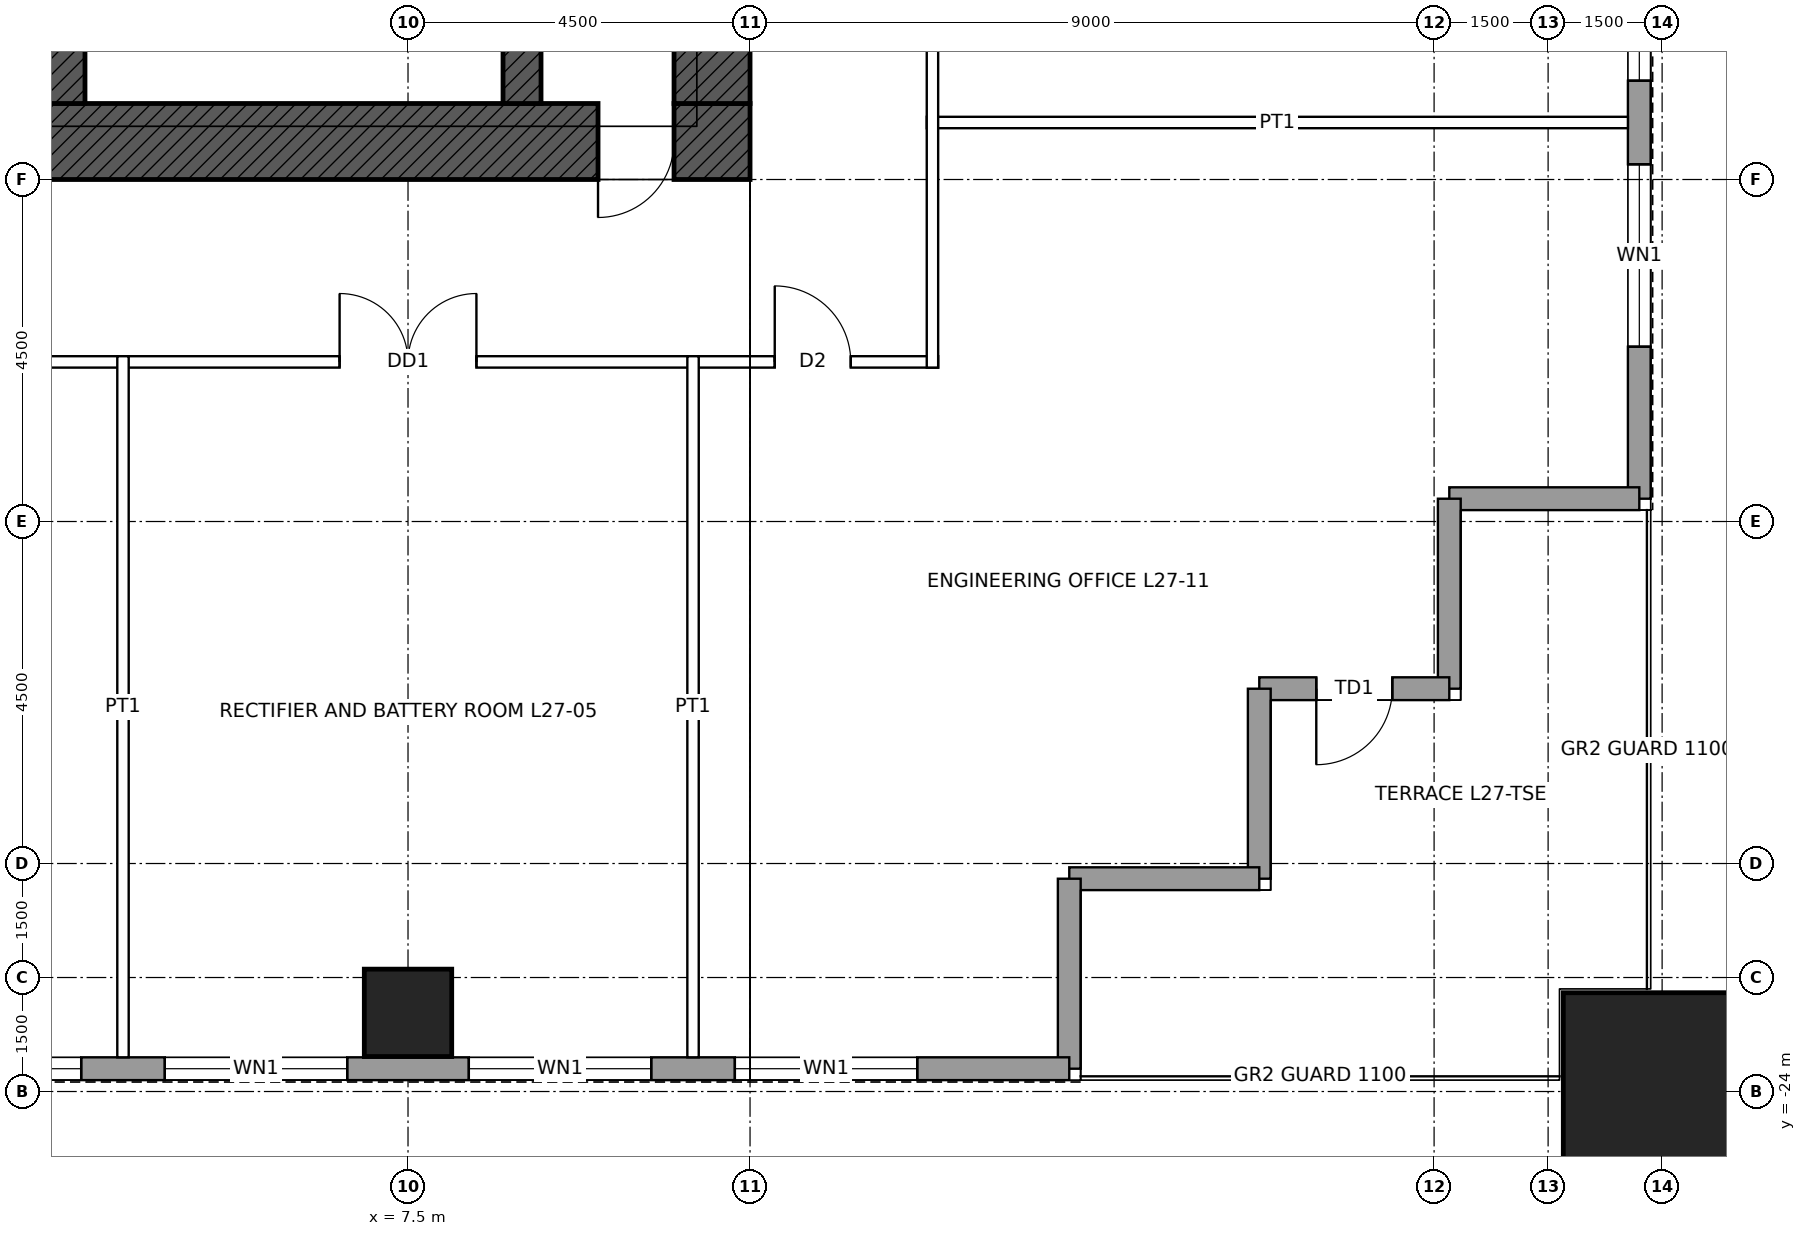
"""IFC4 building model, lengths in metres.
Left out: names, types, materials, properties, quantities, classifications, styles, units other than length and angle.
Written with IfcOpenShell. Run it as: python <this file> out.ifc"""

import sys

from ifc_helpers import new_model, si_unit, direction, frame, frame_2d, origin, origin_2d, place, context, subcontext, project, spatial, rectangle, hollow_rectangle, extrude, element, fill, save


model = new_model("IFC4")
c1 = context("Model", 3, precision=1e-05, world=origin(), true_north=direction((0.0, 1.0)))
c2 = subcontext(c1, "Body", "Model", "MODEL_VIEW")
j1 = project(units=[si_unit("LENGTHUNIT", "METRE"), si_unit("PLANEANGLEUNIT", "RADIAN")], contexts=[c1])
p1 = place(None, origin())
s1 = spatial("IfcSite", under=j1, at=p1, CompositionType="ELEMENT")
p2 = place(p1, origin())
s2 = spatial("IfcBuilding", under=s1, at=p2, CompositionType="ELEMENT")
p3 = place(p2, frame((0.0, 0.0, 135.9)))
s3 = spatial("IfcBuildingStorey", under=s2, at=p3, CompositionType="ELEMENT", Elevation=135.9)
p4 = place(p3, frame((24.0, -24.0, 0.0), z_axis=(0.0, 0.0, 1.0), x_axis=(1.0, 0.0, 0.0)))
e1 = element("IfcColumn", 1, at=p4, inside=s3, PredefinedType="COLUMN", context=c2, shape_type="SweptSolid", body=[
    extrude(hollow_rectangle(XDim=2.6, YDim=2.6, WallThickness=0.13, at=origin_2d()), origin(), (0.0, 0.0, 1.0), 4.5),
])
p5 = place(p3, frame((7.5, -22.965, 0.0), z_axis=(0.0, 0.0, 1.0), x_axis=(1.0, 0.0, 0.0)))
e2 = element("IfcColumn", 2, at=p5, inside=s3, PredefinedType="COLUMN", context=c2, shape_type="SweptSolid", body=[
    extrude(hollow_rectangle(XDim=1.15, YDim=1.15, WallThickness=0.075, at=origin_2d()), origin(), (0.0, 0.0, 1.0), 4.5),
])
p6 = place(p3, frame((12.0, -11.5, 0.0), z_axis=(0.0, 0.0, 1.0), x_axis=(-1.0, 0.0, 0.0)))
e3 = element("IfcWall", 3, at=p6, inside=s3, PredefinedType="SHEAR", context=c2, shape_type="SweptSolid", body=[
    extrude(rectangle(XDim=24.0, YDim=1.0, at=frame_2d((12.0, 0.0))), origin(), (0.0, 0.0, 1.0), 4.5),
])
p7 = place(p6, frame((11.5, 0.0, 0.0)))
e4 = element("IfcOpeningElement", 4, at=p7, cuts=e3, PredefinedType="OPENING", context=c2, shape_type="SweptSolid", body=[
    extrude(rectangle(XDim=1.0, YDim=2.1, at=frame_2d((0.5, 1.05))), frame((0.0, 0.51, 0.0), z_axis=(0.0, -1.0, 0.0), x_axis=(1.0, 0.0, 0.0)), (0.0, 0.0, 1.0), 1.02),
])
p8 = place(p6, frame((1.0, 0.0, 0.0)))
e5 = element("IfcOpeningElement", 5, at=p8, cuts=e3, PredefinedType="OPENING", context=c2, shape_type="SweptSolid", body=[
    extrude(rectangle(XDim=1.0, YDim=2.4, at=frame_2d((0.5, 1.2))), frame((0.0, 0.51, 0.0), z_axis=(0.0, -1.0, 0.0), x_axis=(1.0, 0.0, 0.0)), (0.0, 0.0, 1.0), 1.02),
])
p9 = place(p3, frame((11.5, 11.0, 0.0), z_axis=(0.0, 0.0, 1.0), x_axis=(0.0, -1.0, 0.0)))
e6 = element("IfcWall", 6, at=p9, inside=s3, PredefinedType="SHEAR", context=c2, shape_type="SweptSolid", body=[
    extrude(rectangle(XDim=22.0, YDim=1.0, at=frame_2d((11.0, 0.0))), origin(), (0.0, 0.0, 1.0), 4.5),
])
p10 = place(p9, frame((10.5, 0.0, 0.0)))
e7 = element("IfcOpeningElement", 7, at=p10, cuts=e6, PredefinedType="OPENING", context=c2, shape_type="SweptSolid", body=[
    extrude(rectangle(XDim=1.0, YDim=2.4, at=frame_2d((0.5, 1.2))), frame((0.0, 0.51, 0.0), z_axis=(0.0, -1.0, 0.0), x_axis=(1.0, 0.0, 0.0)), (0.0, 0.0, 1.0), 1.02),
])
p11 = place(p3, frame((9.0, -11.0, 0.0), z_axis=(0.0, 0.0, 1.0), x_axis=(0.0, 1.0, 0.0)))
e8 = element("IfcWall", 8, at=p11, inside=s3, PredefinedType="SHEAR", context=c2, shape_type="SweptSolid", body=[
    extrude(rectangle(XDim=6.5, YDim=0.5, at=frame_2d((3.25, 0.0))), origin(), (0.0, 0.0, 1.0), 4.5),
])
p12 = place(p11, frame((4.25, 0.0, 0.0)))
e9 = element("IfcOpeningElement", 9, at=p12, cuts=e8, PredefinedType="OPENING", context=c2, shape_type="SweptSolid", body=[
    extrude(rectangle(XDim=1.0, YDim=2.1, at=frame_2d((0.5, 1.05))), frame((0.0, 0.26, 0.0), z_axis=(0.0, -1.0, 0.0), x_axis=(1.0, 0.0, 0.0)), (0.0, 0.0, 1.0), 0.52),
])
p13 = place(p3, frame((3.0, -11.0, 0.0), z_axis=(0.0, 0.0, 1.0), x_axis=(0.0, 1.0, 0.0)))
e10 = element("IfcWall", 10, at=p13, inside=s3, PredefinedType="SHEAR", context=c2, shape_type="SweptSolid", body=[
    extrude(rectangle(XDim=6.5, YDim=0.5, at=frame_2d((3.25, 0.0))), origin(), (0.0, 0.0, 1.0), 4.5),
])
p14 = place(p3, frame((23.7, 16.2, 0.0), z_axis=(0.0, 0.0, 1.0), x_axis=(0.0, -1.0, 0.0)))
e11 = element("IfcWall", 11, at=p14, inside=s3, PredefinedType="SOLIDWALL", context=c2, shape_type="SweptSolid", body=[
    extrude(rectangle(XDim=32.4, YDim=0.3, at=frame_2d((16.2, 0.0))), origin(), (0.0, 0.0, 1.0), 4.3),
])
p15 = place(p14, frame((2.0, 0.0, 1.0)))
e12 = element("IfcOpeningElement", 12, at=p15, cuts=e11, PredefinedType="OPENING", context=c2, shape_type="SweptSolid", body=[
    extrude(rectangle(XDim=2.4, YDim=1.2, at=frame_2d((1.2, 0.6))), frame((0.0, 0.16, 0.0), z_axis=(0.0, -1.0, 0.0), x_axis=(1.0, 0.0, 0.0)), (0.0, 0.0, 1.0), 0.32),
])
p16 = place(p14, frame((5.5, 0.0, 1.0)))
e13 = element("IfcOpeningElement", 13, at=p16, cuts=e11, PredefinedType="OPENING", context=c2, shape_type="SweptSolid", body=[
    extrude(rectangle(XDim=2.4, YDim=1.2, at=frame_2d((1.2, 0.6))), frame((0.0, 0.16, 0.0), z_axis=(0.0, -1.0, 0.0), x_axis=(1.0, 0.0, 0.0)), (0.0, 0.0, 1.0), 0.32),
])
p17 = place(p14, frame((9.5, 0.0, 1.0)))
e14 = element("IfcOpeningElement", 14, at=p17, cuts=e11, PredefinedType="OPENING", context=c2, shape_type="SweptSolid", body=[
    extrude(rectangle(XDim=2.4, YDim=1.2, at=frame_2d((1.2, 0.6))), frame((0.0, 0.16, 0.0), z_axis=(0.0, -1.0, 0.0), x_axis=(1.0, 0.0, 0.0)), (0.0, 0.0, 1.0), 0.32),
])
p18 = place(p14, frame((13.0, 0.0, 1.0)))
e15 = element("IfcOpeningElement", 15, at=p18, cuts=e11, PredefinedType="OPENING", context=c2, shape_type="SweptSolid", body=[
    extrude(rectangle(XDim=2.4, YDim=1.2, at=frame_2d((1.2, 0.6))), frame((0.0, 0.16, 0.0), z_axis=(0.0, -1.0, 0.0), x_axis=(1.0, 0.0, 0.0)), (0.0, 0.0, 1.0), 0.32),
])
p19 = place(p14, frame((17.0, 0.0, 1.0)))
e16 = element("IfcOpeningElement", 16, at=p19, cuts=e11, PredefinedType="OPENING", context=c2, shape_type="SweptSolid", body=[
    extrude(rectangle(XDim=2.4, YDim=1.2, at=frame_2d((1.2, 0.6))), frame((0.0, 0.16, 0.0), z_axis=(0.0, -1.0, 0.0), x_axis=(1.0, 0.0, 0.0)), (0.0, 0.0, 1.0), 0.32),
])
p20 = place(p14, frame((20.5, 0.0, 1.0)))
e17 = element("IfcOpeningElement", 17, at=p20, cuts=e11, PredefinedType="OPENING", context=c2, shape_type="SweptSolid", body=[
    extrude(rectangle(XDim=2.4, YDim=1.2, at=frame_2d((1.2, 0.6))), frame((0.0, 0.16, 0.0), z_axis=(0.0, -1.0, 0.0), x_axis=(1.0, 0.0, 0.0)), (0.0, 0.0, 1.0), 0.32),
])
p21 = place(p14, frame((24.5, 0.0, 1.0)))
e18 = element("IfcOpeningElement", 18, at=p21, cuts=e11, PredefinedType="OPENING", context=c2, shape_type="SweptSolid", body=[
    extrude(rectangle(XDim=2.4, YDim=1.2, at=frame_2d((1.2, 0.6))), frame((0.0, 0.16, 0.0), z_axis=(0.0, -1.0, 0.0), x_axis=(1.0, 0.0, 0.0)), (0.0, 0.0, 1.0), 0.32),
])
p22 = place(p14, frame((28.0, 0.0, 1.0)))
e19 = element("IfcOpeningElement", 19, at=p22, cuts=e11, PredefinedType="OPENING", context=c2, shape_type="SweptSolid", body=[
    extrude(rectangle(XDim=2.4, YDim=1.2, at=frame_2d((1.2, 0.6))), frame((0.0, 0.16, 0.0), z_axis=(0.0, -1.0, 0.0), x_axis=(1.0, 0.0, 0.0)), (0.0, 0.0, 1.0), 0.32),
])
for number, where, z_axis, x_axis in (
    (20, (23.7, -16.2, 0.0), (0.0, 0.0, 1.0), (-1.0, 0.0, 0.0)),
    (21, (21.2, -16.2, 0.0), (0.0, 0.0, 1.0), (0.0, -1.0, 0.0)),
):
    element("IfcWall", number, at=place(p3, frame(where, z_axis=z_axis, x_axis=x_axis)), inside=s3, PredefinedType="SOLIDWALL", context=c2, shape_type="SweptSolid", body=[
        extrude(rectangle(XDim=2.5, YDim=0.3, at=frame_2d((1.25, 0.0))), origin(), (0.0, 0.0, 1.0), 4.3),
    ])
p23 = place(p3, frame((21.2, -18.7, 0.0), z_axis=(0.0, 0.0, 1.0), x_axis=(-1.0, 0.0, 0.0)))
e22 = element("IfcWall", 22, at=p23, inside=s3, PredefinedType="SOLIDWALL", context=c2, shape_type="SweptSolid", body=[
    extrude(rectangle(XDim=2.5, YDim=0.3, at=frame_2d((1.25, 0.0))), origin(), (0.0, 0.0, 1.0), 4.3),
])
p24 = place(p23, frame((0.75, 0.0, 0.0)))
e23 = element("IfcOpeningElement", 23, at=p24, cuts=e22, PredefinedType="OPENING", context=c2, shape_type="SweptSolid", body=[
    extrude(rectangle(XDim=1.0, YDim=2.4, at=frame_2d((0.5, 1.2))), frame((0.0, 0.16, 0.0), z_axis=(0.0, -1.0, 0.0), x_axis=(1.0, 0.0, 0.0)), (0.0, 0.0, 1.0), 0.32),
])
for number, where, z_axis, x_axis in (
    (24, (18.7, -18.7, 0.0), (0.0, 0.0, 1.0), (0.0, -1.0, 0.0)),
    (25, (18.7, -21.2, 0.0), (0.0, 0.0, 1.0), (-1.0, 0.0, 0.0)),
    (26, (16.2, -21.2, 0.0), (0.0, 0.0, 1.0), (0.0, -1.0, 0.0)),
):
    element("IfcWall", number, at=place(p3, frame(where, z_axis=z_axis, x_axis=x_axis)), inside=s3, PredefinedType="SOLIDWALL", context=c2, shape_type="SweptSolid", body=[
        extrude(rectangle(XDim=2.5, YDim=0.3, at=frame_2d((1.25, 0.0))), origin(), (0.0, 0.0, 1.0), 4.3),
    ])
p25 = place(p3, frame((16.2, -23.7, 0.0), z_axis=(0.0, 0.0, 1.0), x_axis=(-1.0, 0.0, 0.0)))
e27 = element("IfcWall", 27, at=p25, inside=s3, PredefinedType="SOLIDWALL", context=c2, shape_type="SweptSolid", body=[
    extrude(rectangle(XDim=32.4, YDim=0.3, at=frame_2d((16.2, 0.0))), origin(), (0.0, 0.0, 1.0), 4.3),
])
p26 = place(p25, frame((2.0, 0.0, 1.0)))
e28 = element("IfcOpeningElement", 28, at=p26, cuts=e27, PredefinedType="OPENING", context=c2, shape_type="SweptSolid", body=[
    extrude(rectangle(XDim=2.4, YDim=1.2, at=frame_2d((1.2, 0.6))), frame((0.0, 0.16, 0.0), z_axis=(0.0, -1.0, 0.0), x_axis=(1.0, 0.0, 0.0)), (0.0, 0.0, 1.0), 0.32),
])
p27 = place(p25, frame((5.5, 0.0, 1.0)))
e29 = element("IfcOpeningElement", 29, at=p27, cuts=e27, PredefinedType="OPENING", context=c2, shape_type="SweptSolid", body=[
    extrude(rectangle(XDim=2.4, YDim=1.2, at=frame_2d((1.2, 0.6))), frame((0.0, 0.16, 0.0), z_axis=(0.0, -1.0, 0.0), x_axis=(1.0, 0.0, 0.0)), (0.0, 0.0, 1.0), 0.32),
])
p28 = place(p25, frame((9.5, 0.0, 1.0)))
e30 = element("IfcOpeningElement", 30, at=p28, cuts=e27, PredefinedType="OPENING", context=c2, shape_type="SweptSolid", body=[
    extrude(rectangle(XDim=2.4, YDim=1.2, at=frame_2d((1.2, 0.6))), frame((0.0, 0.16, 0.0), z_axis=(0.0, -1.0, 0.0), x_axis=(1.0, 0.0, 0.0)), (0.0, 0.0, 1.0), 0.32),
])
p29 = place(p25, frame((13.0, 0.0, 1.0)))
e31 = element("IfcOpeningElement", 31, at=p29, cuts=e27, PredefinedType="OPENING", context=c2, shape_type="SweptSolid", body=[
    extrude(rectangle(XDim=2.4, YDim=1.2, at=frame_2d((1.2, 0.6))), frame((0.0, 0.16, 0.0), z_axis=(0.0, -1.0, 0.0), x_axis=(1.0, 0.0, 0.0)), (0.0, 0.0, 1.0), 0.32),
])
p30 = place(p25, frame((17.0, 0.0, 1.0)))
e32 = element("IfcOpeningElement", 32, at=p30, cuts=e27, PredefinedType="OPENING", context=c2, shape_type="SweptSolid", body=[
    extrude(rectangle(XDim=2.4, YDim=1.2, at=frame_2d((1.2, 0.6))), frame((0.0, 0.16, 0.0), z_axis=(0.0, -1.0, 0.0), x_axis=(1.0, 0.0, 0.0)), (0.0, 0.0, 1.0), 0.32),
])
p31 = place(p25, frame((20.5, 0.0, 1.0)))
e33 = element("IfcOpeningElement", 33, at=p31, cuts=e27, PredefinedType="OPENING", context=c2, shape_type="SweptSolid", body=[
    extrude(rectangle(XDim=2.4, YDim=1.2, at=frame_2d((1.2, 0.6))), frame((0.0, 0.16, 0.0), z_axis=(0.0, -1.0, 0.0), x_axis=(1.0, 0.0, 0.0)), (0.0, 0.0, 1.0), 0.32),
])
p32 = place(p25, frame((24.5, 0.0, 1.0)))
e34 = element("IfcOpeningElement", 34, at=p32, cuts=e27, PredefinedType="OPENING", context=c2, shape_type="SweptSolid", body=[
    extrude(rectangle(XDim=2.4, YDim=1.2, at=frame_2d((1.2, 0.6))), frame((0.0, 0.16, 0.0), z_axis=(0.0, -1.0, 0.0), x_axis=(1.0, 0.0, 0.0)), (0.0, 0.0, 1.0), 0.32),
])
p33 = place(p25, frame((28.0, 0.0, 1.0)))
e35 = element("IfcOpeningElement", 35, at=p33, cuts=e27, PredefinedType="OPENING", context=c2, shape_type="SweptSolid", body=[
    extrude(rectangle(XDim=2.4, YDim=1.2, at=frame_2d((1.2, 0.6))), frame((0.0, 0.16, 0.0), z_axis=(0.0, -1.0, 0.0), x_axis=(1.0, 0.0, 0.0)), (0.0, 0.0, 1.0), 0.32),
])
p34 = place(p3, frame((-14.475, -14.4, 0.0), z_axis=(0.0, 0.0, 1.0), x_axis=(1.0, 0.0, 0.0)))
e36 = element("IfcWall", 36, at=p34, inside=s3, PredefinedType="PARTITIONING", context=c2, shape_type="SweptSolid", body=[
    extrude(rectangle(XDim=28.95, YDim=0.15, at=frame_2d((14.475, 0.0))), origin(), (0.0, 0.0, 1.0), 4.3),
])
p35 = place(p34, frame((21.075, 0.0, 0.0)))
e37 = element("IfcOpeningElement", 37, at=p35, cuts=e36, PredefinedType="OPENING", context=c2, shape_type="SweptSolid", body=[
    extrude(rectangle(XDim=1.8, YDim=2.4, at=frame_2d((0.9, 1.2))), frame((0.0, 0.085, 0.0), z_axis=(0.0, -1.0, 0.0), x_axis=(1.0, 0.0, 0.0)), (0.0, 0.0, 1.0), 0.17),
])
p36 = place(p34, frame((9.825, 0.0, 0.0)))
e38 = element("IfcOpeningElement", 38, at=p36, cuts=e36, PredefinedType="OPENING", context=c2, shape_type="SweptSolid", body=[
    extrude(rectangle(XDim=1.8, YDim=2.4, at=frame_2d((0.9, 1.2))), frame((0.0, 0.085, 0.0), z_axis=(0.0, -1.0, 0.0), x_axis=(1.0, 0.0, 0.0)), (0.0, 0.0, 1.0), 0.17),
])
p37 = place(p34, frame((26.8, 0.0, 0.0)))
e39 = element("IfcOpeningElement", 39, at=p37, cuts=e36, PredefinedType="OPENING", context=c2, shape_type="SweptSolid", body=[
    extrude(rectangle(XDim=1.0, YDim=2.1, at=frame_2d((0.5, 1.05))), frame((0.0, 0.085, 0.0), z_axis=(0.0, -1.0, 0.0), x_axis=(1.0, 0.0, 0.0)), (0.0, 0.0, 1.0), 0.17),
])
p38 = place(p34, frame((1.15, 0.0, 0.0)))
e40 = element("IfcOpeningElement", 40, at=p38, cuts=e36, PredefinedType="OPENING", context=c2, shape_type="SweptSolid", body=[
    extrude(rectangle(XDim=1.0, YDim=2.1, at=frame_2d((0.5, 1.05))), frame((0.0, 0.085, 0.0), z_axis=(0.0, -1.0, 0.0), x_axis=(1.0, 0.0, 0.0)), (0.0, 0.0, 1.0), 0.17),
])
for number, where, z_axis, x_axis in (
    (41, (14.325, -11.25, 0.0), (0.0, 0.0, 1.0), (1.0, 0.0, 0.0)),
    (42, (3.75, -23.55, 0.0), (0.0, 0.0, 1.0), (0.0, 1.0, 0.0)),
    (43, (11.25, -23.55, 0.0), (0.0, 0.0, 1.0), (0.0, 1.0, 0.0)),
):
    element("IfcWall", number, at=place(p3, frame(where, z_axis=z_axis, x_axis=x_axis)), inside=s3, PredefinedType="PARTITIONING", context=c2, shape_type="SweptSolid", body=[
        extrude(rectangle(XDim=9.225, YDim=0.15, at=frame_2d((4.613, 0.0))), origin(), (0.0, 0.0, 1.0), 3.431),
    ])
p39 = place(p3, frame((14.4, -14.475, 0.0), z_axis=(0.0, 0.0, 1.0), x_axis=(0.0, 1.0, 0.0)))
e44 = element("IfcWall", 44, at=p39, inside=s3, PredefinedType="PARTITIONING", context=c2, shape_type="SweptSolid", body=[
    extrude(rectangle(XDim=28.95, YDim=0.15, at=frame_2d((14.475, 0.0))), origin(), (0.0, 0.0, 1.0), 4.3),
])
p40 = place(p39, frame((17.325, 0.0, 0.0)))
e45 = element("IfcOpeningElement", 45, at=p40, cuts=e44, PredefinedType="OPENING", context=c2, shape_type="SweptSolid", body=[
    extrude(rectangle(XDim=1.8, YDim=2.4, at=frame_2d((0.9, 1.2))), frame((0.0, 0.085, 0.0), z_axis=(0.0, -1.0, 0.0), x_axis=(1.0, 0.0, 0.0)), (0.0, 0.0, 1.0), 0.17),
])
p41 = place(p39, frame((6.075, 0.0, 0.0)))
e46 = element("IfcOpeningElement", 46, at=p41, cuts=e44, PredefinedType="OPENING", context=c2, shape_type="SweptSolid", body=[
    extrude(rectangle(XDim=1.8, YDim=2.4, at=frame_2d((0.9, 1.2))), frame((0.0, 0.085, 0.0), z_axis=(0.0, -1.0, 0.0), x_axis=(1.0, 0.0, 0.0)), (0.0, 0.0, 1.0), 0.17),
])
p42 = place(p21, origin())
e47 = element("IfcWindow", 47, at=p42, inside=s3, PartitioningType="SINGLE_PANEL", PredefinedType="WINDOW", context=c2, shape_type="SweptSolid", body=[
    extrude(rectangle(XDim=2.4, YDim=1.2, at=frame_2d((1.2, 0.6))), frame((0.0, 0.03, 0.0), z_axis=(0.0, -1.0, 0.0), x_axis=(1.0, 0.0, 0.0)), (0.0, 0.0, 1.0), 0.06),
])
fill(e18, e47)
p43 = place(p22, origin())
e48 = element("IfcWindow", 48, at=p43, inside=s3, PartitioningType="SINGLE_PANEL", PredefinedType="WINDOW", context=c2, shape_type="SweptSolid", body=[
    extrude(rectangle(XDim=2.4, YDim=1.2, at=frame_2d((1.2, 0.6))), frame((0.0, 0.03, 0.0), z_axis=(0.0, -1.0, 0.0), x_axis=(1.0, 0.0, 0.0)), (0.0, 0.0, 1.0), 0.06),
])
fill(e19, e48)
p44 = place(p24, origin())
e49 = element("IfcDoor", 49, at=p44, inside=s3, OperationType="SINGLE_SWING_RIGHT", PredefinedType="DOOR", context=c2, shape_type="SweptSolid", body=[
    extrude(rectangle(XDim=1.0, YDim=2.4, at=frame_2d((0.5, 1.2))), frame((0.0, 0.025, 0.0), z_axis=(0.0, -1.0, 0.0), x_axis=(1.0, 0.0, 0.0)), (0.0, 0.0, 1.0), 0.05),
])
fill(e23, e49)
p45 = place(p26, origin())
e50 = element("IfcWindow", 50, at=p45, inside=s3, PartitioningType="SINGLE_PANEL", PredefinedType="WINDOW", context=c2, shape_type="SweptSolid", body=[
    extrude(rectangle(XDim=2.4, YDim=1.2, at=frame_2d((1.2, 0.6))), frame((0.0, 0.03, 0.0), z_axis=(0.0, -1.0, 0.0), x_axis=(1.0, 0.0, 0.0)), (0.0, 0.0, 1.0), 0.06),
])
fill(e28, e50)
p46 = place(p27, origin())
e51 = element("IfcWindow", 51, at=p46, inside=s3, PartitioningType="SINGLE_PANEL", PredefinedType="WINDOW", context=c2, shape_type="SweptSolid", body=[
    extrude(rectangle(XDim=2.4, YDim=1.2, at=frame_2d((1.2, 0.6))), frame((0.0, 0.03, 0.0), z_axis=(0.0, -1.0, 0.0), x_axis=(1.0, 0.0, 0.0)), (0.0, 0.0, 1.0), 0.06),
])
fill(e29, e51)
p47 = place(p28, origin())
e52 = element("IfcWindow", 52, at=p47, inside=s3, PartitioningType="SINGLE_PANEL", PredefinedType="WINDOW", context=c2, shape_type="SweptSolid", body=[
    extrude(rectangle(XDim=2.4, YDim=1.2, at=frame_2d((1.2, 0.6))), frame((0.0, 0.03, 0.0), z_axis=(0.0, -1.0, 0.0), x_axis=(1.0, 0.0, 0.0)), (0.0, 0.0, 1.0), 0.06),
])
fill(e30, e52)
p48 = place(p29, origin())
e53 = element("IfcWindow", 53, at=p48, inside=s3, PartitioningType="SINGLE_PANEL", PredefinedType="WINDOW", context=c2, shape_type="SweptSolid", body=[
    extrude(rectangle(XDim=2.4, YDim=1.2, at=frame_2d((1.2, 0.6))), frame((0.0, 0.03, 0.0), z_axis=(0.0, -1.0, 0.0), x_axis=(1.0, 0.0, 0.0)), (0.0, 0.0, 1.0), 0.06),
])
fill(e31, e53)
p49 = place(p8, origin())
e54 = element("IfcDoor", 54, at=p49, inside=s3, OperationType="SINGLE_SWING_RIGHT", PredefinedType="DOOR", context=c2, shape_type="SweptSolid", body=[
    extrude(rectangle(XDim=1.0, YDim=2.4, at=frame_2d((0.5, 1.2))), frame((0.0, 0.485, 0.0), z_axis=(0.0, -1.0, 0.0), x_axis=(1.0, 0.0, 0.0)), (0.0, 0.0, 1.0), 0.05),
])
fill(e5, e54)
p50 = place(p35, origin())
e55 = element("IfcDoor", 55, at=p50, inside=s3, OperationType="DOUBLE_DOOR_SINGLE_SWING", PredefinedType="DOOR", context=c2, shape_type="SweptSolid", body=[
    extrude(rectangle(XDim=1.8, YDim=2.4, at=frame_2d((0.9, 1.2))), frame((0.0, 0.025, 0.0), z_axis=(0.0, -1.0, 0.0), x_axis=(1.0, 0.0, 0.0)), (0.0, 0.0, 1.0), 0.05),
])
fill(e37, e55)
p51 = place(p37, origin())
e56 = element("IfcDoor", 56, at=p51, inside=s3, OperationType="SINGLE_SWING_LEFT", PredefinedType="DOOR", context=c2, shape_type="SweptSolid", body=[
    extrude(rectangle(XDim=1.0, YDim=2.1, at=frame_2d((0.5, 1.05))), frame((0.0, 0.025, 0.0), z_axis=(0.0, -1.0, 0.0), x_axis=(1.0, 0.0, 0.0)), (0.0, 0.0, 1.0), 0.05),
])
fill(e39, e56)
save(model, sys.argv[1])
